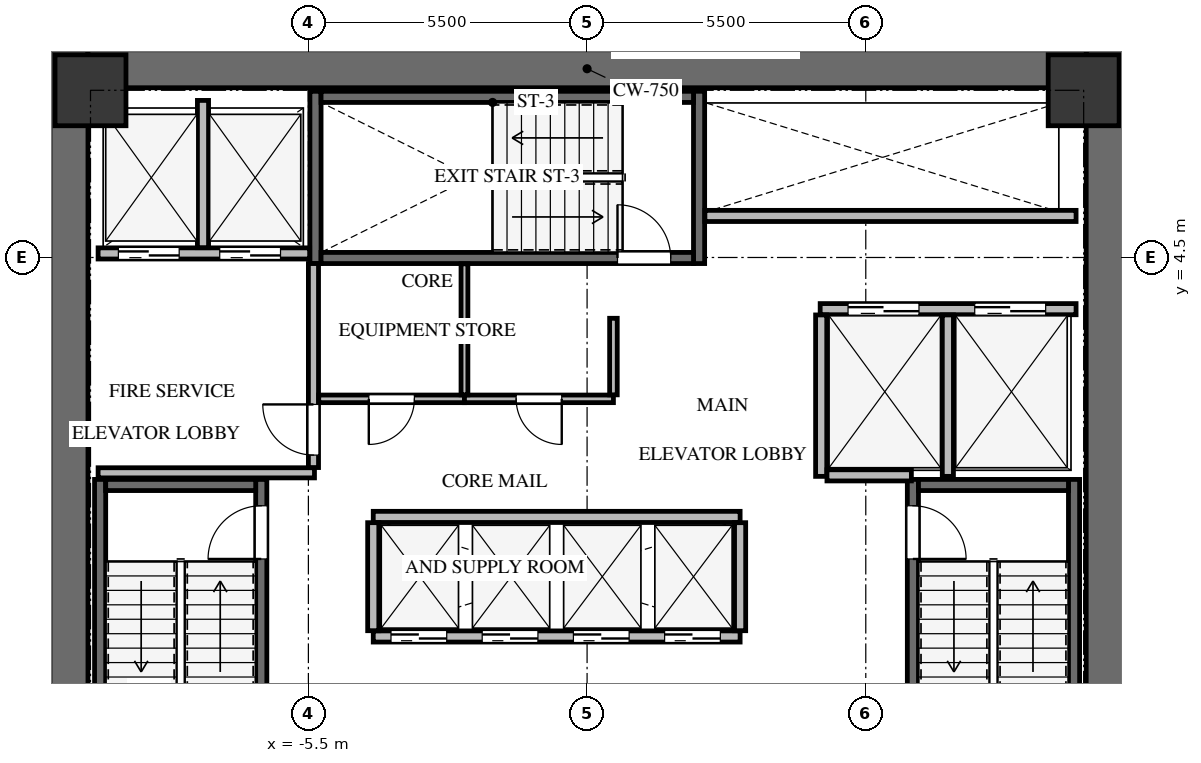
"""IFC4 building model, lengths in metres.
Left out: names, types, materials, properties, quantities, classifications, styles, units other than length and angle.
Written with IfcOpenShell. Run it as: python <this file> out.ifc"""

import sys

from ifc_helpers import new_model, si_unit, direction, frame, frame_2d, origin, origin_2d, place, context, subcontext, project, spatial, rectangle, extrude, source, transform, mapped, element, fill, save


model = new_model("IFC4")
c1 = context("Model", 3, precision=1e-05, world=origin(), true_north=direction((0.0, 1.0)))
c2 = subcontext(c1, "Body", "Model", "MODEL_VIEW")
j1 = project(units=[si_unit("LENGTHUNIT", "METRE"), si_unit("PLANEANGLEUNIT", "RADIAN")], contexts=[c1])
p1 = place(None, origin())
s1 = spatial("IfcSite", under=j1, at=p1, CompositionType="ELEMENT")
p2 = place(p1, origin())
s2 = spatial("IfcBuilding", under=s1, at=p2, CompositionType="ELEMENT")
p3 = place(p2, frame((0.0, 0.0, 130.5)))
s3 = spatial("IfcBuildingStorey", under=s2, at=p3, CompositionType="ELEMENT", Elevation=130.5)
for number, where, z_axis, x_axis in (
    (1, (-10.225, -8.6, 0.0), (0.0, 0.0, 1.0), (0.0, 1.0, 0.0)),
    (2, (10.225, -8.6, 0.0), (0.0, 0.0, 1.0), (0.0, 1.0, 0.0)),
):
    element("IfcWall", number, at=place(p3, frame(where, z_axis=z_axis, x_axis=x_axis)), inside=s3, PredefinedType="SHEAR", context=c2, shape_type="SweptSolid", body=[
        extrude(rectangle(XDim=17.2, YDim=0.75, at=frame_2d((8.6, 0.0))), origin(), (0.0, 0.0, 1.0), 3.3),
    ])
p4 = place(p3, frame((-9.85, 8.225, 0.0), z_axis=(0.0, 0.0, 1.0), x_axis=(1.0, 0.0, 0.0)))
e3 = element("IfcWall", 3, at=p4, inside=s3, PredefinedType="SHEAR", context=c2, shape_type="SweptSolid", body=[
    extrude(rectangle(XDim=19.7, YDim=0.75, at=frame_2d((9.85, 0.0))), origin(), (0.0, 0.0, 1.0), 3.3),
])
p5 = place(p3, frame((-6.43, -7.77, -0.24), z_axis=(0.0, 0.0, 1.0), x_axis=(0.0, 1.0, 0.0)))
e4 = element("IfcWall", 4, at=p5, inside=s3, PredefinedType="SHEAR", context=c2, shape_type="SweptSolid", body=[
    extrude(rectangle(XDim=7.89, YDim=0.22, at=frame_2d((3.945, 0.0))), origin(), (0.0, 0.0, 1.0), 3.3),
])
p6 = place(p5, frame((6.32, 0.0, 0.0)))
e5 = element("IfcOpeningElement", 5, at=p6, cuts=e4, PredefinedType="OPENING", context=c2, shape_type="SweptSolid", body=[
    extrude(rectangle(XDim=1.05, YDim=2.15, at=frame_2d((0.525, 1.075))), frame((0.0, 0.12, 0.0), z_axis=(0.0, -1.0, 0.0), x_axis=(1.0, 0.0, 0.0)), (0.0, 0.0, 1.0), 0.24),
])
p7 = place(p3, frame((-9.61, 0.12, -0.24), z_axis=(0.0, 0.0, 1.0), x_axis=(0.0, -1.0, 0.0)))
e6 = element("IfcWall", 6, at=p7, inside=s3, PredefinedType="SHEAR", context=c2, shape_type="SweptSolid", body=[
    extrude(rectangle(XDim=7.89, YDim=0.22, at=frame_2d((3.945, 0.0))), origin(), (0.0, 0.0, 1.0), 3.3),
])
p8 = place(p3, frame((-6.54, 0.01, -0.24), z_axis=(0.0, 0.0, 1.0), x_axis=(-1.0, 0.0, 0.0)))
e7 = element("IfcWall", 7, at=p8, inside=s3, PredefinedType="SHEAR", context=c2, shape_type="SweptSolid", body=[
    extrude(rectangle(XDim=2.96, YDim=0.22, at=frame_2d((1.48, 0.0))), origin(), (0.0, 0.0, 1.0), 3.3),
])
p9 = place(p3, frame((9.61, -7.77, -0.24), z_axis=(0.0, 0.0, 1.0), x_axis=(0.0, 1.0, 0.0)))
e8 = element("IfcWall", 8, at=p9, inside=s3, PredefinedType="SHEAR", context=c2, shape_type="SweptSolid", body=[
    extrude(rectangle(XDim=7.89, YDim=0.22, at=frame_2d((3.945, 0.0))), origin(), (0.0, 0.0, 1.0), 3.3),
])
p10 = place(p3, frame((6.43, 0.12, -0.24), z_axis=(0.0, 0.0, 1.0), x_axis=(0.0, -1.0, 0.0)))
e9 = element("IfcWall", 9, at=p10, inside=s3, PredefinedType="SHEAR", context=c2, shape_type="SweptSolid", body=[
    extrude(rectangle(XDim=7.89, YDim=0.22, at=frame_2d((3.945, 0.0))), origin(), (0.0, 0.0, 1.0), 3.3),
])
p11 = place(p10, frame((0.52, 0.0, 0.0)))
e10 = element("IfcOpeningElement", 10, at=p11, cuts=e9, PredefinedType="OPENING", context=c2, shape_type="SweptSolid", body=[
    extrude(rectangle(XDim=1.05, YDim=2.15, at=frame_2d((0.525, 1.075))), frame((0.0, 0.12, 0.0), z_axis=(0.0, -1.0, 0.0), x_axis=(1.0, 0.0, 0.0)), (0.0, 0.0, 1.0), 0.24),
])
p12 = place(p3, frame((9.5, 0.01, -0.24), z_axis=(0.0, 0.0, 1.0), x_axis=(-1.0, 0.0, 0.0)))
e11 = element("IfcWall", 11, at=p12, inside=s3, PredefinedType="SHEAR", context=c2, shape_type="SweptSolid", body=[
    extrude(rectangle(XDim=2.96, YDim=0.22, at=frame_2d((1.48, 0.0))), origin(), (0.0, 0.0, 1.0), 3.3),
])
for number, where, z_axis, x_axis in (
    (12, (2.21, 4.38, -0.24), (0.0, 0.0, 1.0), (0.0, 1.0, 0.0)),
    (13, (-5.36, 7.78, -0.24), (0.0, 0.0, 1.0), (0.0, -1.0, 0.0)),
):
    element("IfcWall", number, at=place(p3, frame(where, z_axis=z_axis, x_axis=x_axis)), inside=s3, PredefinedType="SHEAR", context=c2, shape_type="SweptSolid", body=[
        extrude(rectangle(XDim=3.4, YDim=0.22, at=frame_2d((1.7, 0.0))), origin(), (0.0, 0.0, 1.0), 3.3),
    ])
p13 = place(p3, frame((-5.25, 4.49, -0.24), z_axis=(0.0, 0.0, 1.0), x_axis=(1.0, 0.0, 0.0)))
e14 = element("IfcWall", 14, at=p13, inside=s3, PredefinedType="SHEAR", context=c2, shape_type="SweptSolid", body=[
    extrude(rectangle(XDim=7.35, YDim=0.22, at=frame_2d((3.675, 0.0))), origin(), (0.0, 0.0, 1.0), 3.3),
])
p14 = place(p13, frame((5.85, 0.0, 0.0)))
e15 = element("IfcOpeningElement", 15, at=p14, cuts=e14, PredefinedType="OPENING", context=c2, shape_type="SweptSolid", body=[
    extrude(rectangle(XDim=1.05, YDim=2.15, at=frame_2d((0.525, 1.075))), frame((0.0, 0.12, 0.0), z_axis=(0.0, -1.0, 0.0), x_axis=(1.0, 0.0, 0.0)), (0.0, 0.0, 1.0), 0.24),
])
p15 = place(p3, frame((2.1, 7.67, -0.24), z_axis=(0.0, 0.0, 1.0), x_axis=(-1.0, 0.0, 0.0)))
e16 = element("IfcWall", 16, at=p15, inside=s3, PredefinedType="SHEAR", context=c2, shape_type="SweptSolid", body=[
    extrude(rectangle(XDim=7.35, YDim=0.22, at=frame_2d((3.675, 0.0))), origin(), (0.0, 0.0, 1.0), 3.3),
])
m1 = source(origin(), c2, "Body", "SweptSolid", [
    extrude(rectangle(XDim=1.4, YDim=1.4, at=origin_2d()), origin(), (0.0, 0.0, 1.0), 3.3),
])
for number, where, z_axis, x_axis in (
    (17, (9.8, 7.8, -0.24), (0.0, 0.0, 1.0), (1.0, 0.0, 0.0)),
    (18, (-9.8, 7.8, -0.24), (0.0, 0.0, 1.0), (1.0, 0.0, 0.0)),
):
    element("IfcColumn", number, at=place(p3, frame(where, z_axis=z_axis, x_axis=x_axis)), inside=s3, PredefinedType="COLUMN", context=c2, shape_type="MappedRepresentation", body=[
        mapped(m1, transform((0.0, 0.0, 0.0), x_axis=(1.0, 0.0, 0.0), y_axis=(0.0, 1.0, 0.0), z_axis=(0.0, 0.0, 1.0), scale=1.0)),
    ])
p16 = place(p3, frame((-9.65, 4.58, 0.0), z_axis=(0.0, 0.0, 1.0), x_axis=(1.0, 0.0, 0.0)))
e19 = element("IfcWall", 19, at=p16, inside=s3, PredefinedType="SOLIDWALL", context=c2, shape_type="SweptSolid", body=[
    extrude(rectangle(XDim=4.175, YDim=0.22, at=frame_2d((2.087, 0.0))), origin(), (0.0, 0.0, 1.0), 3.045),
])
p17 = place(p16, frame((0.4, 0.0, 0.0)))
e20 = element("IfcOpeningElement", 20, at=p17, cuts=e19, PredefinedType="OPENING", context=c2, shape_type="SweptSolid", body=[
    extrude(rectangle(XDim=1.2, YDim=2.15, at=frame_2d((0.6, 1.075))), frame((0.0, 0.12, 0.0), z_axis=(0.0, -1.0, 0.0), x_axis=(1.0, 0.0, 0.0)), (0.0, 0.0, 1.0), 0.24),
])
p18 = place(p16, frame((2.4, 0.0, 0.0)))
e21 = element("IfcOpeningElement", 21, at=p18, cuts=e19, PredefinedType="OPENING", context=c2, shape_type="SweptSolid", body=[
    extrude(rectangle(XDim=1.2, YDim=2.15, at=frame_2d((0.6, 1.075))), frame((0.0, 0.12, 0.0), z_axis=(0.0, -1.0, 0.0), x_axis=(1.0, 0.0, 0.0)), (0.0, 0.0, 1.0), 0.24),
])
p19 = place(p3, frame((-7.58, 4.694, 0.0), z_axis=(0.0, 0.0, 1.0), x_axis=(0.0, 1.0, 0.0)))
e22 = element("IfcWall", 22, at=p19, inside=s3, PredefinedType="SOLIDWALL", context=c2, shape_type="SweptSolid", body=[
    extrude(rectangle(XDim=2.906, YDim=0.22, at=frame_2d((1.453, 0.0))), origin(), (0.0, 0.0, 1.0), 3.045),
])
p20 = place(p3, frame((-9.65, 0.25, 0.0), z_axis=(0.0, 0.0, 1.0), x_axis=(1.0, 0.0, 0.0)))
e23 = element("IfcWall", 23, at=p20, inside=s3, PredefinedType="SOLIDWALL", context=c2, shape_type="SweptSolid", body=[
    extrude(rectangle(XDim=4.27, YDim=0.2, at=frame_2d((2.135, 0.0))), origin(), (0.0, 0.0, 1.0), 3.045),
])
p21 = place(p3, frame((-5.4, 0.354, 0.0), z_axis=(0.0, 0.0, 1.0), x_axis=(0.0, 1.0, 0.0)))
e24 = element("IfcWall", 24, at=p21, inside=s3, PredefinedType="SOLIDWALL", context=c2, shape_type="SweptSolid", body=[
    extrude(rectangle(XDim=4.026, YDim=0.2, at=frame_2d((2.013, 0.0))), origin(), (0.0, 0.0, 1.0), 3.045),
])
p22 = place(p21, frame((0.246, 0.0, 0.0)))
e25 = element("IfcOpeningElement", 25, at=p22, cuts=e24, PredefinedType="OPENING", context=c2, shape_type="SweptSolid", body=[
    extrude(rectangle(XDim=1.0, YDim=2.15, at=frame_2d((0.5, 1.075))), frame((0.0, 0.11, 0.0), z_axis=(0.0, -1.0, 0.0), x_axis=(1.0, 0.0, 0.0)), (0.0, 0.0, 1.0), 0.22),
])
p23 = place(p3, frame((4.6, 3.48, 0.0), z_axis=(0.0, 0.0, 1.0), x_axis=(1.0, 0.0, 0.0)))
e26 = element("IfcWall", 26, at=p23, inside=s3, PredefinedType="SOLIDWALL", context=c2, shape_type="SweptSolid", body=[
    extrude(rectangle(XDim=5.05, YDim=0.22, at=frame_2d((2.525, 0.0))), origin(), (0.0, 0.0, 1.0), 3.045),
])
p24 = place(p23, frame((0.55, 0.0, 0.0)))
e27 = element("IfcOpeningElement", 27, at=p24, cuts=e26, PredefinedType="OPENING", context=c2, shape_type="SweptSolid", body=[
    extrude(rectangle(XDim=1.4, YDim=2.15, at=frame_2d((0.7, 1.075))), frame((0.0, 0.12, 0.0), z_axis=(0.0, -1.0, 0.0), x_axis=(1.0, 0.0, 0.0)), (0.0, 0.0, 1.0), 0.24),
])
p25 = place(p23, frame((3.05, 0.0, 0.0)))
e28 = element("IfcOpeningElement", 28, at=p25, cuts=e26, PredefinedType="OPENING", context=c2, shape_type="SweptSolid", body=[
    extrude(rectangle(XDim=1.4, YDim=2.15, at=frame_2d((0.7, 1.075))), frame((0.0, 0.12, 0.0), z_axis=(0.0, -1.0, 0.0), x_axis=(1.0, 0.0, 0.0)), (0.0, 0.0, 1.0), 0.24),
])
for number, where, z_axis, x_axis in (
    (29, (4.62, 0.18, 0.0), (0.0, 0.0, 1.0), (0.0, 1.0, 0.0)),
    (30, (7.12, 0.18, 0.0), (0.0, 0.0, 1.0), (0.0, 1.0, 0.0)),
):
    element("IfcWall", number, at=place(p3, frame(where, z_axis=z_axis, x_axis=x_axis)), inside=s3, PredefinedType="SOLIDWALL", context=c2, shape_type="SweptSolid", body=[
        extrude(rectangle(XDim=3.186, YDim=0.22, at=frame_2d((1.593, 0.0))), origin(), (0.0, 0.0, 1.0), 3.045),
    ])
p26 = place(p3, frame((4.734, 0.2, 0.0), z_axis=(0.0, 0.0, 1.0), x_axis=(1.0, 0.0, 0.0)))
e31 = element("IfcWall", 31, at=p26, inside=s3, PredefinedType="SOLIDWALL", context=c2, shape_type="SweptSolid", body=[
    extrude(rectangle(XDim=1.666, YDim=0.22, at=frame_2d((0.833, 0.0))), origin(), (0.0, 0.0, 1.0), 3.045),
])
p27 = place(p3, frame((-4.22, -2.98, 0.0), z_axis=(0.0, 0.0, 1.0), x_axis=(1.0, 0.0, 0.0)))
e32 = element("IfcWall", 32, at=p27, inside=s3, PredefinedType="SOLIDWALL", context=c2, shape_type="SweptSolid", body=[
    extrude(rectangle(XDim=7.24, YDim=0.22, at=frame_2d((3.62, 0.0))), origin(), (0.0, 0.0, 1.0), 3.045),
])
p28 = place(p27, frame((0.35, 0.0, 0.0)))
e33 = element("IfcOpeningElement", 33, at=p28, cuts=e32, PredefinedType="OPENING", context=c2, shape_type="SweptSolid", body=[
    extrude(rectangle(XDim=1.1, YDim=2.15, at=frame_2d((0.55, 1.075))), frame((0.0, 0.12, 0.0), z_axis=(0.0, -1.0, 0.0), x_axis=(1.0, 0.0, 0.0)), (0.0, 0.0, 1.0), 0.24),
])
p29 = place(p27, frame((2.15, 0.0, 0.0)))
e34 = element("IfcOpeningElement", 34, at=p29, cuts=e32, PredefinedType="OPENING", context=c2, shape_type="SweptSolid", body=[
    extrude(rectangle(XDim=1.1, YDim=2.15, at=frame_2d((0.55, 1.075))), frame((0.0, 0.12, 0.0), z_axis=(0.0, -1.0, 0.0), x_axis=(1.0, 0.0, 0.0)), (0.0, 0.0, 1.0), 0.24),
])
p30 = place(p27, frame((3.95, 0.0, 0.0)))
e35 = element("IfcOpeningElement", 35, at=p30, cuts=e32, PredefinedType="OPENING", context=c2, shape_type="SweptSolid", body=[
    extrude(rectangle(XDim=1.1, YDim=2.15, at=frame_2d((0.55, 1.075))), frame((0.0, 0.12, 0.0), z_axis=(0.0, -1.0, 0.0), x_axis=(1.0, 0.0, 0.0)), (0.0, 0.0, 1.0), 0.24),
])
p31 = place(p27, frame((5.75, 0.0, 0.0)))
e36 = element("IfcOpeningElement", 36, at=p31, cuts=e32, PredefinedType="OPENING", context=c2, shape_type="SweptSolid", body=[
    extrude(rectangle(XDim=1.1, YDim=2.15, at=frame_2d((0.55, 1.075))), frame((0.0, 0.12, 0.0), z_axis=(0.0, -1.0, 0.0), x_axis=(1.0, 0.0, 0.0)), (0.0, 0.0, 1.0), 0.24),
])
p32 = place(p3, frame((-4.22, -0.62, 0.0), z_axis=(0.0, 0.0, 1.0), x_axis=(1.0, 0.0, 0.0)))
e37 = element("IfcWall", 37, at=p32, inside=s3, PredefinedType="SOLIDWALL", context=c2, shape_type="SweptSolid", body=[
    extrude(rectangle(XDim=7.24, YDim=0.22, at=frame_2d((3.62, 0.0))), origin(), (0.0, 0.0, 1.0), 3.045),
])
for number, where, z_axis, x_axis in (
    (38, (-4.22, -2.866, 0.0), (0.0, 0.0, 1.0), (0.0, 1.0, 0.0)),
    (39, (3.02, -2.866, 0.0), (0.0, 0.0, 1.0), (0.0, 1.0, 0.0)),
):
    element("IfcWall", number, at=place(p3, frame(where, z_axis=z_axis, x_axis=x_axis)), inside=s3, PredefinedType="SOLIDWALL", context=c2, shape_type="SweptSolid", body=[
        extrude(rectangle(XDim=2.132, YDim=0.22, at=frame_2d((1.066, 0.0))), origin(), (0.0, 0.0, 1.0), 3.045),
    ])
p33 = place(p3, frame((2.325, 5.32, 0.0), z_axis=(0.0, 0.0, 1.0), x_axis=(1.0, 0.0, 0.0)))
e40 = element("IfcWall", 40, at=p33, inside=s3, PredefinedType="SOLIDWALL", context=c2, shape_type="SweptSolid", body=[
    extrude(rectangle(XDim=7.325, YDim=0.22, at=frame_2d((3.663, 0.0))), origin(), (0.0, 0.0, 1.0), 3.045),
])
p34 = place(p3, frame((-2.42, 1.71, 0.0), z_axis=(0.0, 0.0, 1.0), x_axis=(-1.0, 0.0, 0.0)))
e41 = element("IfcWall", 41, at=p34, inside=s3, PredefinedType="PARTITIONING", context=c2, shape_type="SweptSolid", body=[
    extrude(rectangle(XDim=2.876, YDim=0.15, at=frame_2d((1.438, 0.0))), origin(), (0.0, 0.0, 1.0), 3.045),
])
p35 = place(p34, frame((0.988, 0.0, 0.0)))
e42 = element("IfcOpeningElement", 42, at=p35, cuts=e41, PredefinedType="OPENING", context=c2, shape_type="SweptSolid", body=[
    extrude(rectangle(XDim=0.9, YDim=2.05, at=frame_2d((0.45, 1.025))), frame((0.0, 0.085, 0.0), z_axis=(0.0, -1.0, 0.0), x_axis=(1.0, 0.0, 0.0)), (0.0, 0.0, 1.0), 0.17),
])
p36 = place(p3, frame((0.52, 1.71, 0.0), z_axis=(0.0, 0.0, 1.0), x_axis=(-1.0, 0.0, 0.0)))
e43 = element("IfcWall", 43, at=p36, inside=s3, PredefinedType="PARTITIONING", context=c2, shape_type="SweptSolid", body=[
    extrude(rectangle(XDim=2.94, YDim=0.15, at=frame_2d((1.47, 0.0))), origin(), (0.0, 0.0, 1.0), 3.045),
])
p37 = place(p36, frame((1.02, 0.0, 0.0)))
e44 = element("IfcOpeningElement", 44, at=p37, cuts=e43, PredefinedType="OPENING", context=c2, shape_type="SweptSolid", body=[
    extrude(rectangle(XDim=0.9, YDim=2.05, at=frame_2d((0.45, 1.025))), frame((0.0, 0.085, 0.0), z_axis=(0.0, -1.0, 0.0), x_axis=(1.0, 0.0, 0.0)), (0.0, 0.0, 1.0), 0.17),
])
p38 = place(p3, frame((0.52, 3.3, 0.0), z_axis=(0.0, 0.0, 1.0), x_axis=(0.0, -1.0, 0.0)))
e45 = element("IfcWall", 45, at=p38, inside=s3, PredefinedType="PARTITIONING", context=c2, shape_type="SweptSolid", body=[
    extrude(rectangle(XDim=1.511, YDim=0.15, at=frame_2d((0.755, 0.0))), origin(), (0.0, 0.0, 1.0), 3.045),
])
p39 = place(p3, frame((-2.42, 4.375, 0.0), z_axis=(0.0, 0.0, 1.0), x_axis=(0.0, -1.0, 0.0)))
e46 = element("IfcWall", 46, at=p39, inside=s3, PredefinedType="PARTITIONING", context=c2, shape_type="SweptSolid", body=[
    extrude(rectangle(XDim=2.586, YDim=0.135, at=frame_2d((1.293, 0.0))), origin(), (0.0, 0.0, 1.0), 3.045),
])
m2 = source(origin(), c2, "Body", "SweptSolid", [
    extrude(rectangle(XDim=1.05, YDim=2.15, at=frame_2d((0.525, 1.075))), frame((0.0, 0.025, 0.0), z_axis=(0.0, -1.0, 0.0), x_axis=(1.0, 0.0, 0.0)), (0.0, 0.0, 1.0), 0.05),
])
p40 = place(p6, origin())
e47 = element("IfcDoor", 47, at=p40, inside=s3, OperationType="SINGLE_SWING_LEFT", PredefinedType="DOOR", context=c2, shape_type="MappedRepresentation", body=[
    mapped(m2, transform((0.0, 0.0, 0.0), x_axis=(1.0, 0.0, 0.0), y_axis=(0.0, 1.0, 0.0), z_axis=(0.0, 0.0, 1.0), scale=1.0)),
])
fill(e5, e47)
m3 = source(origin(), c2, "Body", "SweptSolid", [
    extrude(rectangle(XDim=1.05, YDim=2.15, at=frame_2d((0.525, 1.075))), frame((0.0, 0.025, 0.0), z_axis=(0.0, -1.0, 0.0), x_axis=(1.0, 0.0, 0.0)), (0.0, 0.0, 1.0), 0.05),
])
p41 = place(p11, origin())
e48 = element("IfcDoor", 48, at=p41, inside=s3, OperationType="SINGLE_SWING_RIGHT", PredefinedType="DOOR", context=c2, shape_type="MappedRepresentation", body=[
    mapped(m3, transform((0.0, 0.0, 0.0), x_axis=(1.0, 0.0, 0.0), y_axis=(0.0, 1.0, 0.0), z_axis=(0.0, 0.0, 1.0), scale=1.0)),
])
fill(e10, e48)
p42 = place(p14, origin())
e49 = element("IfcDoor", 49, at=p42, inside=s3, OperationType="SINGLE_SWING_LEFT", PredefinedType="DOOR", context=c2, shape_type="MappedRepresentation", body=[
    mapped(m2, transform((0.0, 0.0, 0.0), x_axis=(1.0, 0.0, 0.0), y_axis=(0.0, 1.0, 0.0), z_axis=(0.0, 0.0, 1.0), scale=1.0)),
])
fill(e15, e49)
m4 = source(origin(), c2, "Body", "SweptSolid", [
    extrude(rectangle(XDim=1.2, YDim=2.15, at=frame_2d((0.6, 1.075))), frame((0.0, 0.025, 0.0), z_axis=(0.0, -1.0, 0.0), x_axis=(1.0, 0.0, 0.0)), (0.0, 0.0, 1.0), 0.05),
])
p43 = place(p17, origin())
e50 = element("IfcDoor", 50, at=p43, inside=s3, OperationType="DOUBLE_DOOR_SLIDING", PredefinedType="DOOR", context=c2, shape_type="MappedRepresentation", body=[
    mapped(m4, transform((0.0, 0.0, 0.0), x_axis=(1.0, 0.0, 0.0), y_axis=(0.0, 1.0, 0.0), z_axis=(0.0, 0.0, 1.0), scale=1.0)),
])
fill(e20, e50)
p44 = place(p18, origin())
e51 = element("IfcDoor", 51, at=p44, inside=s3, OperationType="DOUBLE_DOOR_SLIDING", PredefinedType="DOOR", context=c2, shape_type="MappedRepresentation", body=[
    mapped(m4, transform((0.0, 0.0, 0.0), x_axis=(1.0, 0.0, 0.0), y_axis=(0.0, 1.0, 0.0), z_axis=(0.0, 0.0, 1.0), scale=1.0)),
])
fill(e21, e51)
m5 = source(origin(), c2, "Body", "SweptSolid", [
    extrude(rectangle(XDim=1.0, YDim=2.15, at=frame_2d((0.5, 1.075))), frame((0.0, 0.025, 0.0), z_axis=(0.0, -1.0, 0.0), x_axis=(1.0, 0.0, 0.0)), (0.0, 0.0, 1.0), 0.05),
])
p45 = place(p22, origin())
e52 = element("IfcDoor", 52, at=p45, inside=s3, OperationType="SINGLE_SWING_RIGHT", PredefinedType="DOOR", context=c2, shape_type="MappedRepresentation", body=[
    mapped(m5, transform((0.0, 0.0, 0.0), x_axis=(1.0, 0.0, 0.0), y_axis=(0.0, 1.0, 0.0), z_axis=(0.0, 0.0, 1.0), scale=1.0)),
])
fill(e25, e52)
m6 = source(origin(), c2, "Body", "SweptSolid", [
    extrude(rectangle(XDim=1.4, YDim=2.15, at=frame_2d((0.7, 1.075))), frame((0.0, 0.025, 0.0), z_axis=(0.0, -1.0, 0.0), x_axis=(1.0, 0.0, 0.0)), (0.0, 0.0, 1.0), 0.05),
])
p46 = place(p24, origin())
e53 = element("IfcDoor", 53, at=p46, inside=s3, OperationType="DOUBLE_DOOR_SLIDING", PredefinedType="DOOR", context=c2, shape_type="MappedRepresentation", body=[
    mapped(m6, transform((0.0, 0.0, 0.0), x_axis=(1.0, 0.0, 0.0), y_axis=(0.0, 1.0, 0.0), z_axis=(0.0, 0.0, 1.0), scale=1.0)),
])
fill(e27, e53)
p47 = place(p25, origin())
e54 = element("IfcDoor", 54, at=p47, inside=s3, OperationType="DOUBLE_DOOR_SLIDING", PredefinedType="DOOR", context=c2, shape_type="MappedRepresentation", body=[
    mapped(m6, transform((0.0, 0.0, 0.0), x_axis=(1.0, 0.0, 0.0), y_axis=(0.0, 1.0, 0.0), z_axis=(0.0, 0.0, 1.0), scale=1.0)),
])
fill(e28, e54)
m7 = source(origin(), c2, "Body", "SweptSolid", [
    extrude(rectangle(XDim=1.1, YDim=2.15, at=frame_2d((0.55, 1.075))), frame((0.0, 0.025, 0.0), z_axis=(0.0, -1.0, 0.0), x_axis=(1.0, 0.0, 0.0)), (0.0, 0.0, 1.0), 0.05),
])
p48 = place(p28, origin())
e55 = element("IfcDoor", 55, at=p48, inside=s3, OperationType="DOUBLE_DOOR_SLIDING", PredefinedType="DOOR", context=c2, shape_type="MappedRepresentation", body=[
    mapped(m7, transform((0.0, 0.0, 0.0), x_axis=(1.0, 0.0, 0.0), y_axis=(0.0, 1.0, 0.0), z_axis=(0.0, 0.0, 1.0), scale=1.0)),
])
fill(e33, e55)
p49 = place(p29, origin())
e56 = element("IfcDoor", 56, at=p49, inside=s3, OperationType="DOUBLE_DOOR_SLIDING", PredefinedType="DOOR", context=c2, shape_type="MappedRepresentation", body=[
    mapped(m7, transform((0.0, 0.0, 0.0), x_axis=(1.0, 0.0, 0.0), y_axis=(0.0, 1.0, 0.0), z_axis=(0.0, 0.0, 1.0), scale=1.0)),
])
fill(e34, e56)
p50 = place(p30, origin())
e57 = element("IfcDoor", 57, at=p50, inside=s3, OperationType="DOUBLE_DOOR_SLIDING", PredefinedType="DOOR", context=c2, shape_type="MappedRepresentation", body=[
    mapped(m7, transform((0.0, 0.0, 0.0), x_axis=(1.0, 0.0, 0.0), y_axis=(0.0, 1.0, 0.0), z_axis=(0.0, 0.0, 1.0), scale=1.0)),
])
fill(e35, e57)
p51 = place(p31, origin())
e58 = element("IfcDoor", 58, at=p51, inside=s3, OperationType="DOUBLE_DOOR_SLIDING", PredefinedType="DOOR", context=c2, shape_type="MappedRepresentation", body=[
    mapped(m7, transform((0.0, 0.0, 0.0), x_axis=(1.0, 0.0, 0.0), y_axis=(0.0, 1.0, 0.0), z_axis=(0.0, 0.0, 1.0), scale=1.0)),
])
fill(e36, e58)
m8 = source(origin(), c2, "Body", "SweptSolid", [
    extrude(rectangle(XDim=0.9, YDim=2.05, at=frame_2d((0.45, 1.025))), frame((0.0, 0.025, 0.0), z_axis=(0.0, -1.0, 0.0), x_axis=(1.0, 0.0, 0.0)), (0.0, 0.0, 1.0), 0.05),
])
p52 = place(p35, origin())
e59 = element("IfcDoor", 59, at=p52, inside=s3, OperationType="SINGLE_SWING_RIGHT", PredefinedType="DOOR", context=c2, shape_type="MappedRepresentation", body=[
    mapped(m8, transform((0.0, 0.0, 0.0), x_axis=(1.0, 0.0, 0.0), y_axis=(0.0, 1.0, 0.0), z_axis=(0.0, 0.0, 1.0), scale=1.0)),
])
fill(e42, e59)
m9 = source(origin(), c2, "Body", "SweptSolid", [
    extrude(rectangle(XDim=0.9, YDim=2.05, at=frame_2d((0.45, 1.025))), frame((0.0, 0.025, 0.0), z_axis=(0.0, -1.0, 0.0), x_axis=(1.0, 0.0, 0.0)), (0.0, 0.0, 1.0), 0.05),
])
p53 = place(p37, origin())
e60 = element("IfcDoor", 60, at=p53, inside=s3, OperationType="SINGLE_SWING_LEFT", PredefinedType="DOOR", context=c2, shape_type="MappedRepresentation", body=[
    mapped(m9, transform((0.0, 0.0, 0.0), x_axis=(1.0, 0.0, 0.0), y_axis=(0.0, 1.0, 0.0), z_axis=(0.0, 0.0, 1.0), scale=1.0)),
])
fill(e44, e60)
save(model, sys.argv[1])
